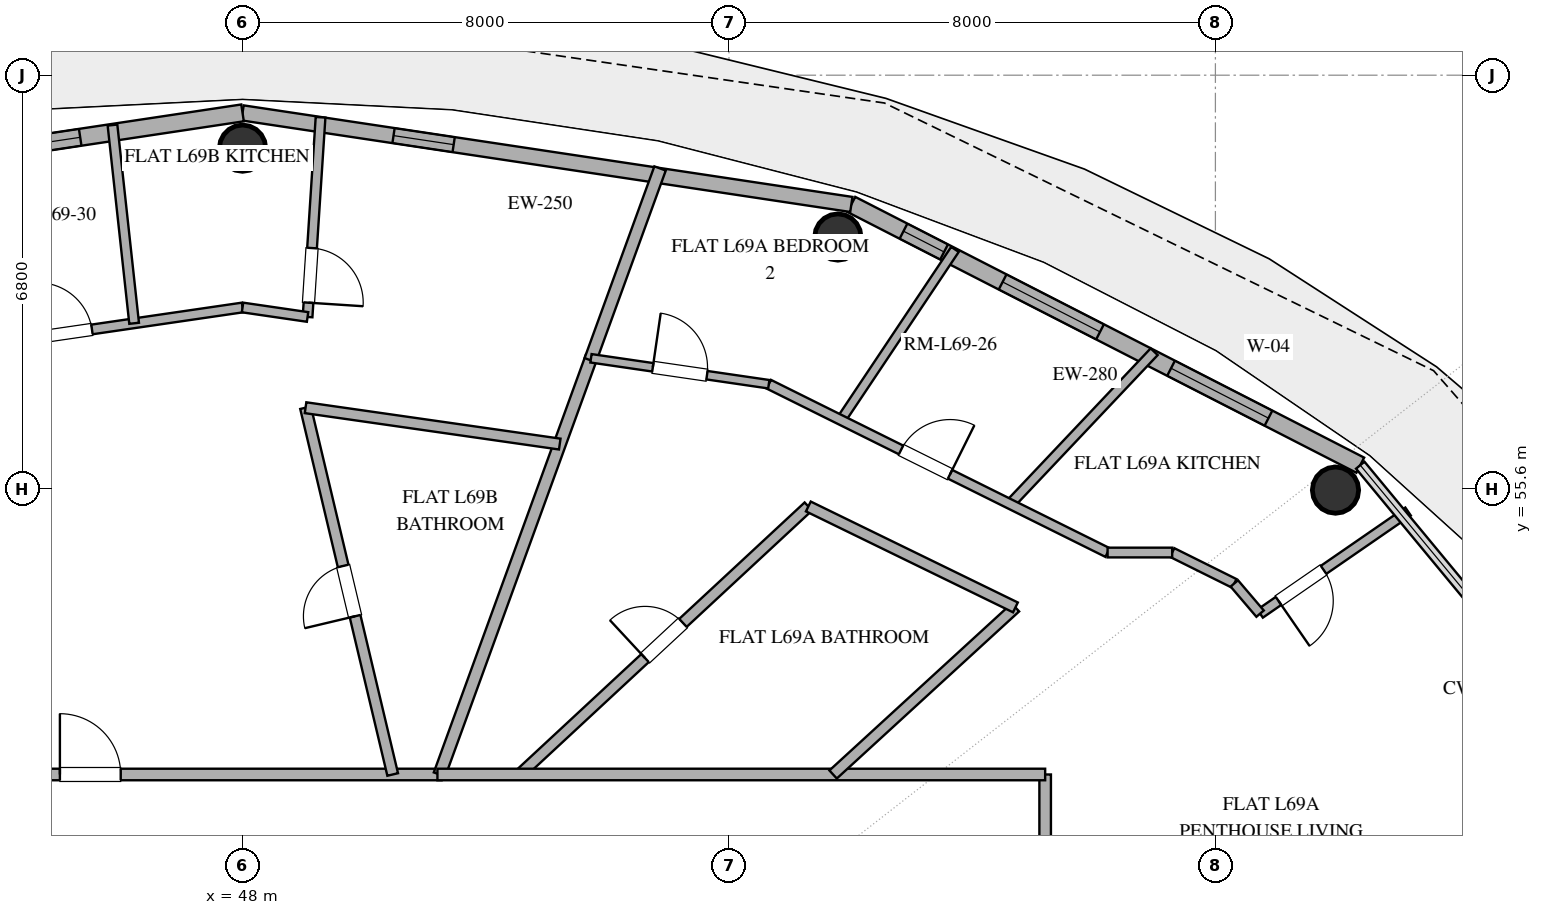
"""IFC4 building model, lengths in metres.
Left out: names, types, materials, properties, quantities, classifications, styles, units other than length and angle.
Written with IfcOpenShell. Run it as: python <this file> out.ifc"""

import sys

from ifc_helpers import new_model, si_unit, direction, frame, frame_2d, origin, origin_2d, place, context, subcontext, project, spatial, rectangle, hollow_circle, extrude, element, fill, save


model = new_model("IFC4")
c1 = context("Model", 3, precision=1e-05, world=origin(), true_north=direction((0.0, 1.0)))
c2 = subcontext(c1, "Body", "Model", "MODEL_VIEW")
j1 = project(units=[si_unit("LENGTHUNIT", "METRE"), si_unit("PLANEANGLEUNIT", "RADIAN")], contexts=[c1])
p1 = place(None, origin())
s1 = spatial("IfcSite", under=j1, at=p1, CompositionType="ELEMENT")
p2 = place(p1, origin())
s2 = spatial("IfcBuilding", under=s1, at=p2, CompositionType="ELEMENT")
p3 = place(p2, frame((0.0, 0.0, 269.4)))
s3 = spatial("IfcBuildingStorey", under=s2, at=p3, CompositionType="ELEMENT", Elevation=269.4)
for number, where, z_axis, x_axis in (
    (1, (65.975, 55.576, 0.0), (0.0, 0.0, 1.0), (1.0, 0.0, 0.0)),
    (2, (57.791, 59.739, 0.0), (0.0, 0.0, 1.0), (1.0, 0.0, 0.0)),
    (3, (48.0, 61.2, 0.0), (0.0, 0.0, 1.0), (1.0, 0.0, 0.0)),
):
    element("IfcColumn", number, at=place(p3, frame(where, z_axis=z_axis, x_axis=x_axis)), inside=s3, PredefinedType="COLUMN", context=c2, shape_type="SweptSolid", body=[
        extrude(hollow_circle(Radius=0.381, WallThickness=0.025, at=origin_2d()), origin(), (0.0, 0.0, 1.0), 3.37),
    ])
p4 = place(p3, frame((66.383, 55.987, 0.0), z_axis=(0.0, 0.0, 1.0), x_axis=(-0.890007394051, 0.455946091699, 0.0)))
e4 = element("IfcWall", 4, at=p4, inside=s3, PredefinedType="SOLIDWALL", context=c2, shape_type="SweptSolid", body=[
    extrude(rectangle(XDim=9.404, YDim=0.28, at=frame_2d((4.702, 0.0))), origin(), (0.0, 0.0, 1.0), 3.37),
])
p5 = place(p4, frame((1.696, 0.0, 0.85)))
e5 = element("IfcOpeningElement", 5, at=p5, cuts=e4, PredefinedType="OPENING", context=c2, shape_type="SweptSolid", body=[
    extrude(rectangle(XDim=1.8, YDim=2.2, at=frame_2d((0.9, 1.1))), frame((0.0, 0.15, 0.0), z_axis=(0.0, -1.0, 0.0), x_axis=(1.0, 0.0, 0.0)), (0.0, 0.0, 1.0), 0.3),
])
p6 = place(p4, frame((4.809, 0.0, 0.85)))
e6 = element("IfcOpeningElement", 6, at=p6, cuts=e4, PredefinedType="OPENING", context=c2, shape_type="SweptSolid", body=[
    extrude(rectangle(XDim=1.8, YDim=2.2, at=frame_2d((0.9, 1.1))), frame((0.0, 0.15, 0.0), z_axis=(0.0, -1.0, 0.0), x_axis=(1.0, 0.0, 0.0)), (0.0, 0.0, 1.0), 0.3),
])
p7 = place(p4, frame((7.691, 0.0, 0.85)))
e7 = element("IfcOpeningElement", 7, at=p7, cuts=e4, PredefinedType="OPENING", context=c2, shape_type="SweptSolid", body=[
    extrude(rectangle(XDim=0.75, YDim=1.8, at=frame_2d((0.375, 0.9))), frame((0.0, 0.15, 0.0), z_axis=(0.0, -1.0, 0.0), x_axis=(1.0, 0.0, 0.0)), (0.0, 0.0, 1.0), 0.3),
])
p8 = place(p3, frame((58.013, 60.274, 0.0), z_axis=(0.0, 0.0, 1.0), x_axis=(-0.988882522213, 0.148698881169, 0.0)))
e8 = element("IfcWall", 8, at=p8, inside=s3, PredefinedType="SOLIDWALL", context=c2, shape_type="SweptSolid", body=[
    extrude(rectangle(XDim=10.125, YDim=0.25, at=frame_2d((5.062, 0.0))), origin(), (0.0, 0.0, 1.0), 3.37),
])
p9 = place(p8, frame((6.614, 0.0, 1.42)))
e9 = element("IfcOpeningElement", 9, at=p9, cuts=e8, PredefinedType="OPENING", context=c2, shape_type="SweptSolid", body=[
    extrude(rectangle(XDim=1.0, YDim=1.05, at=frame_2d((0.5, 0.525))), frame((0.0, 0.135, 0.0), z_axis=(0.0, -1.0, 0.0), x_axis=(1.0, 0.0, 0.0)), (0.0, 0.0, 1.0), 0.27),
])
p10 = place(p3, frame((48.0, 61.78, 0.0), z_axis=(0.0, 0.0, 1.0), x_axis=(-0.988882522213, -0.148698881169, 0.0)))
e10 = element("IfcWall", 10, at=p10, inside=s3, PredefinedType="SOLIDWALL", context=c2, shape_type="SweptSolid", body=[
    extrude(rectangle(XDim=10.125, YDim=0.28, at=frame_2d((5.062, 0.0))), origin(), (0.0, 0.0, 1.0), 3.37),
])
p11 = place(p10, frame((2.7, 0.0, 0.85)))
e11 = element("IfcOpeningElement", 11, at=p11, cuts=e10, PredefinedType="OPENING", context=c2, shape_type="SweptSolid", body=[
    extrude(rectangle(XDim=1.65, YDim=2.0, at=frame_2d((0.825, 1.0))), frame((0.0, 0.15, 0.0), z_axis=(0.0, -1.0, 0.0), x_axis=(1.0, 0.0, 0.0)), (0.0, 0.0, 1.0), 0.3),
])
p12 = place(p10, frame((7.456, 0.0, 0.0)))
e12 = element("IfcOpeningElement", 12, at=p12, cuts=e10, PredefinedType="OPENING", context=c2, shape_type="SweptSolid", body=[
    extrude(rectangle(XDim=1.1, YDim=2.25, at=frame_2d((0.55, 1.125))), frame((0.0, 0.15, 0.0), z_axis=(0.0, -1.0, 0.0), x_axis=(1.0, 0.0, 0.0)), (0.0, 0.0, 1.0), 0.3),
])
p13 = place(p3, frame((34.8, 50.9, 0.0), z_axis=(0.0, 0.0, 1.0), x_axis=(1.0, 0.0, 0.0)))
e13 = element("IfcWall", 13, at=p13, inside=s3, PredefinedType="PARTITIONING", context=c2, shape_type="SweptSolid", body=[
    extrude(rectangle(XDim=16.473, YDim=0.19, at=frame_2d((8.237, 0.0))), origin(), (0.0, 0.0, 1.0), 2.73),
])
p14 = place(p13, frame((10.196, 0.0, 0.0)))
e14 = element("IfcOpeningElement", 14, at=p14, cuts=e13, PredefinedType="OPENING", context=c2, shape_type="SweptSolid", body=[
    extrude(rectangle(XDim=1.0, YDim=2.2, at=frame_2d((0.5, 1.1))), frame((0.0, 0.105, 0.0), z_axis=(0.0, -1.0, 0.0), x_axis=(1.0, 0.0, 0.0)), (0.0, 0.0, 1.0), 0.21),
])
p15 = place(p13, frame((2.387, 0.0, 0.0)))
e15 = element("IfcOpeningElement", 15, at=p15, cuts=e13, PredefinedType="OPENING", context=c2, shape_type="SweptSolid", body=[
    extrude(rectangle(XDim=1.0, YDim=2.2, at=frame_2d((0.5, 1.1))), frame((0.0, 0.105, 0.0), z_axis=(0.0, -1.0, 0.0), x_axis=(1.0, 0.0, 0.0)), (0.0, 0.0, 1.0), 0.21),
])
p16 = place(p3, frame((52.558, 50.9, 0.0), z_axis=(0.0, 0.0, 1.0), x_axis=(0.732849863846, 0.68039038578, 0.0)))
e16 = element("IfcWall", 16, at=p16, inside=s3, PredefinedType="PLUMBINGWALL", context=c2, shape_type="SweptSolid", body=[
    extrude(rectangle(XDim=6.478, YDim=0.18, at=frame_2d((3.239, 0.0))), origin(), (0.0, 0.0, 1.0), 2.73),
])
p17 = place(p16, frame((2.814, 0.0, 0.0)))
e17 = element("IfcOpeningElement", 17, at=p17, cuts=e16, PredefinedType="OPENING", context=c2, shape_type="SweptSolid", body=[
    extrude(rectangle(XDim=0.85, YDim=2.1, at=frame_2d((0.425, 1.05))), frame((0.0, 0.1, 0.0), z_axis=(0.0, -1.0, 0.0), x_axis=(1.0, 0.0, 0.0)), (0.0, 0.0, 1.0), 0.2),
])
p18 = place(p3, frame((50.469, 50.9, 0.0), z_axis=(0.0, 0.0, 1.0), x_axis=(-0.231121823084, 0.972924818727, 0.0)))
e18 = element("IfcWall", 18, at=p18, inside=s3, PredefinedType="PLUMBINGWALL", context=c2, shape_type="SweptSolid", body=[
    extrude(rectangle(XDim=6.2, YDim=0.18, at=frame_2d((3.1, 0.0))), origin(), (0.0, 0.0, 1.0), 2.73),
])
p19 = place(p18, frame((2.675, 0.0, 0.0)))
e19 = element("IfcOpeningElement", 19, at=p19, cuts=e18, PredefinedType="OPENING", context=c2, shape_type="SweptSolid", body=[
    extrude(rectangle(XDim=0.85, YDim=2.1, at=frame_2d((0.425, 1.05))), frame((0.0, 0.1, 0.0), z_axis=(0.0, -1.0, 0.0), x_axis=(1.0, 0.0, 0.0)), (0.0, 0.0, 1.0), 0.2),
])
p20 = place(p3, frame((51.239, 50.9, 0.0), z_axis=(0.0, 0.0, 1.0), x_axis=(0.342027045015, 0.939690108748, 0.0)))
e20 = element("IfcWall", 20, at=p20, inside=s3, PredefinedType="PARTITIONING", context=c2, shape_type="SweptSolid", body=[
    extrude(rectangle(XDim=7.316, YDim=0.2, at=frame_2d((3.658, 0.0))), origin(), (0.0, 0.0, 1.0), 2.73),
])
p21 = place(p3, frame((61.2, 50.9, 0.0), z_axis=(0.0, 0.0, 1.0), x_axis=(0.0, -1.0, 0.0)))
e21 = element("IfcWall", 21, at=p21, inside=s3, PredefinedType="PARTITIONING", context=c2, shape_type="SweptSolid", body=[
    extrude(rectangle(XDim=12.47, YDim=0.19, at=frame_2d((6.235, 0.0))), origin(), (0.0, 0.0, 1.0), 2.73),
])
p22 = place(p21, frame((2.198, 0.0, 0.0)))
e22 = element("IfcOpeningElement", 22, at=p22, cuts=e21, PredefinedType="OPENING", context=c2, shape_type="SweptSolid", body=[
    extrude(rectangle(XDim=1.0, YDim=2.2, at=frame_2d((0.5, 1.1))), frame((0.0, 0.105, 0.0), z_axis=(0.0, -1.0, 0.0), x_axis=(1.0, 0.0, 0.0)), (0.0, 0.0, 1.0), 0.21),
])
p23 = place(p21, frame((7.38, 0.0, 0.0)))
e23 = element("IfcOpeningElement", 23, at=p23, cuts=e21, PredefinedType="OPENING", context=c2, shape_type="SweptSolid", body=[
    extrude(rectangle(XDim=1.0, YDim=2.2, at=frame_2d((0.5, 1.1))), frame((0.0, 0.105, 0.0), z_axis=(0.0, -1.0, 0.0), x_axis=(1.0, 0.0, 0.0)), (0.0, 0.0, 1.0), 0.21),
])
p24 = place(p3, frame((51.205, 50.9, 0.0), z_axis=(0.0, 0.0, 1.0), x_axis=(1.0, 0.0, 0.0)))
e24 = element("IfcWall", 24, at=p24, inside=s3, PredefinedType="PARTITIONING", context=c2, shape_type="SweptSolid", body=[
    extrude(rectangle(XDim=9.995, YDim=0.19, at=frame_2d((4.998, 0.0))), origin(), (0.0, 0.0, 1.0), 2.73),
])
p25 = place(p3, frame((49.036, 56.932, 0.0), z_axis=(0.0, 0.0, 1.0), x_axis=(0.989927514161, -0.141575127434, 0.0)))
e25 = element("IfcWall", 25, at=p25, inside=s3, PredefinedType="PLUMBINGWALL", context=c2, shape_type="SweptSolid", body=[
    extrude(rectangle(XDim=4.223, YDim=0.18, at=frame_2d((2.112, 0.0))), origin(), (0.0, 0.0, 1.0), 2.73),
])
p26 = place(p3, frame((60.711, 53.648, 0.0), z_axis=(0.0, 0.0, 1.0), x_axis=(-0.737258783223, -0.675610454745, 0.0)))
e26 = element("IfcWall", 26, at=p26, inside=s3, PredefinedType="PLUMBINGWALL", context=c2, shape_type="SweptSolid", body=[
    extrude(rectangle(XDim=4.067, YDim=0.18, at=frame_2d((2.034, 0.0))), origin(), (0.0, 0.0, 1.0), 2.73),
])
p27 = place(p3, frame((57.305, 55.308, 0.0), z_axis=(0.0, 0.0, 1.0), x_axis=(0.898917645735, -0.438117639667, 0.0)))
e27 = element("IfcWall", 27, at=p27, inside=s3, PredefinedType="PLUMBINGWALL", context=c2, shape_type="SweptSolid", body=[
    extrude(rectangle(XDim=3.789, YDim=0.18, at=frame_2d((1.895, 0.0))), origin(), (0.0, 0.0, 1.0), 2.73),
])
p28 = place(p3, frame((39.345, 57.318, 0.0), z_axis=(0.0, 0.0, 1.0), x_axis=(0.989536136377, 0.144285254977, 0.0)))
e28 = element("IfcWall", 28, at=p28, inside=s3, PredefinedType="PLUMBINGWALL", context=c2, shape_type="SweptSolid", body=[
    extrude(rectangle(XDim=8.746, YDim=0.16, at=frame_2d((4.373, 0.0))), origin(), (0.0, 0.0, 1.0), 2.73),
])
p29 = place(p28, frame((2.481, 0.0, 0.0)))
e29 = element("IfcOpeningElement", 29, at=p29, cuts=e28, PredefinedType="OPENING", context=c2, shape_type="SweptSolid", body=[
    extrude(rectangle(XDim=0.9, YDim=2.1, at=frame_2d((0.45, 1.05))), frame((0.0, 0.09, 0.0), z_axis=(0.0, -1.0, 0.0), x_axis=(1.0, 0.0, 0.0)), (0.0, 0.0, 1.0), 0.18),
])
p30 = place(p28, frame((5.344, 0.0, 0.0)))
e30 = element("IfcOpeningElement", 30, at=p30, cuts=e28, PredefinedType="OPENING", context=c2, shape_type="SweptSolid", body=[
    extrude(rectangle(XDim=0.9, YDim=2.1, at=frame_2d((0.45, 1.05))), frame((0.0, 0.09, 0.0), z_axis=(0.0, -1.0, 0.0), x_axis=(1.0, 0.0, 0.0)), (0.0, 0.0, 1.0), 0.18),
])
p31 = place(p3, frame((60.623, 55.347, 0.0), z_axis=(0.0, 0.0, 1.0), x_axis=(0.687190766796, 0.726477012734, 0.0)))
e31 = element("IfcWall", 31, at=p31, inside=s3, PredefinedType="PLUMBINGWALL", context=c2, shape_type="SweptSolid", body=[
    extrude(rectangle(XDim=3.449, YDim=0.16, at=frame_2d((1.725, 0.0))), origin(), (0.0, 0.0, 1.0), 2.73),
])
p32 = place(p3, frame((59.717, 59.535, 0.0), z_axis=(0.0, 0.0, 1.0), x_axis=(-0.555567743092, -0.831471276013, 0.0)))
e32 = element("IfcWall", 32, at=p32, inside=s3, PredefinedType="PARTITIONING", context=c2, shape_type="SweptSolid", body=[
    extrude(rectangle(XDim=3.376, YDim=0.15, at=frame_2d((1.688, 0.0))), origin(), (0.0, 0.0, 1.0), 2.73),
])
p33 = place(p3, frame((54.867, 60.866, 0.0), z_axis=(0.0, 0.0, 1.0), x_axis=(-0.342000121366, -0.939699907942, 0.0)))
e33 = element("IfcWall", 33, at=p33, inside=s3, PredefinedType="PARTITIONING", context=c2, shape_type="SweptSolid", body=[
    extrude(rectangle(XDim=3.355, YDim=0.2, at=frame_2d((1.678, 0.0))), origin(), (0.0, 0.0, 1.0), 2.73),
])
p34 = place(p3, frame((49.283, 61.708, 0.0), z_axis=(0.0, 0.0, 1.0), x_axis=(-0.064987599341, -0.997886071619, 0.0)))
e34 = element("IfcWall", 34, at=p34, inside=s3, PredefinedType="PLUMBINGWALL", context=c2, shape_type="SweptSolid", body=[
    extrude(rectangle(XDim=3.291, YDim=0.16, at=frame_2d((1.646, 0.0))), origin(), (0.0, 0.0, 1.0), 2.73),
])
p35 = place(p34, frame((2.156, 0.0, 0.0)))
e35 = element("IfcOpeningElement", 35, at=p35, cuts=e34, PredefinedType="OPENING", context=c2, shape_type="SweptSolid", body=[
    extrude(rectangle(XDim=0.9, YDim=2.1, at=frame_2d((0.45, 1.05))), frame((0.0, 0.09, 0.0), z_axis=(0.0, -1.0, 0.0), x_axis=(1.0, 0.0, 0.0)), (0.0, 0.0, 1.0), 0.18),
])
p36 = place(p3, frame((46.217, 58.32, 0.0), z_axis=(0.0, 0.0, 1.0), x_axis=(-0.108559889868, 0.994089910577, 0.0)))
e36 = element("IfcWall", 36, at=p36, inside=s3, PredefinedType="PLUMBINGWALL", context=c2, shape_type="SweptSolid", body=[
    extrude(rectangle(XDim=3.279, YDim=0.16, at=frame_2d((1.639, 0.0))), origin(), (0.0, 0.0, 1.0), 2.73),
])
p37 = place(p3, frame((56.655, 57.318, 0.0), z_axis=(0.0, 0.0, 1.0), x_axis=(0.89555447129, -0.444951895099, 0.0)))
e37 = element("IfcWall", 37, at=p37, inside=s3, PredefinedType="PLUMBINGWALL", context=c2, shape_type="SweptSolid", body=[
    extrude(rectangle(XDim=6.222, YDim=0.16, at=frame_2d((3.111, 0.0))), origin(), (0.0, 0.0, 1.0), 2.73),
])
p38 = place(p37, frame((2.428, 0.0, 0.0)))
e38 = element("IfcOpeningElement", 38, at=p38, cuts=e37, PredefinedType="OPENING", context=c2, shape_type="SweptSolid", body=[
    extrude(rectangle(XDim=0.9, YDim=2.1, at=frame_2d((0.45, 1.05))), frame((0.0, 0.09, 0.0), z_axis=(0.0, -1.0, 0.0), x_axis=(1.0, 0.0, 0.0)), (0.0, 0.0, 1.0), 0.18),
])
p39 = place(p3, frame((67.169, 55.224, 0.0), z_axis=(0.0, 0.0, 1.0), x_axis=(-0.823115625857, -0.567873812101, 0.0)))
e39 = element("IfcWall", 39, at=p39, inside=s3, PredefinedType="PLUMBINGWALL", context=c2, shape_type="SweptSolid", body=[
    extrude(rectangle(XDim=2.957, YDim=0.16, at=frame_2d((1.478, 0.0))), origin(), (0.0, 0.0, 1.0), 2.73),
])
p40 = place(p39, frame((1.688, 0.0, 0.0)))
e40 = element("IfcOpeningElement", 40, at=p40, cuts=e39, PredefinedType="OPENING", context=c2, shape_type="SweptSolid", body=[
    extrude(rectangle(XDim=0.9, YDim=2.1, at=frame_2d((0.45, 1.05))), frame((0.0, 0.09, 0.0), z_axis=(0.0, -1.0, 0.0), x_axis=(1.0, 0.0, 0.0)), (0.0, 0.0, 1.0), 0.18),
])
p41 = place(p3, frame((53.73, 57.744, 0.0), z_axis=(0.0, 0.0, 1.0), x_axis=(0.989530523264, -0.144323745545, 0.0)))
e41 = element("IfcWall", 41, at=p41, inside=s3, PredefinedType="PARTITIONING", context=c2, shape_type="SweptSolid", body=[
    extrude(rectangle(XDim=2.955, YDim=0.14, at=frame_2d((1.478, 0.0))), origin(), (0.0, 0.0, 1.0), 2.73),
])
p42 = place(p41, frame((1.028, 0.0, 0.0)))
e42 = element("IfcOpeningElement", 42, at=p42, cuts=e41, PredefinedType="OPENING", context=c2, shape_type="SweptSolid", body=[
    extrude(rectangle(XDim=0.9, YDim=2.1, at=frame_2d((0.45, 1.05))), frame((0.0, 0.08, 0.0), z_axis=(0.0, -1.0, 0.0), x_axis=(1.0, 0.0, 0.0)), (0.0, 0.0, 1.0), 0.16),
])
p43 = place(p3, frame((64.311, 54.042, 0.0), z_axis=(0.0, 0.0, 1.0), x_axis=(-0.895409226325, 0.445244109912, 0.0)))
e43 = element("IfcWall", 43, at=p43, inside=s3, PredefinedType="PLUMBINGWALL", context=c2, shape_type="SweptSolid", body=[
    extrude(rectangle(XDim=1.141, YDim=0.16, at=frame_2d((0.571, 0.0))), origin(), (0.0, 0.0, 1.0), 2.73),
])
p44 = place(p3, frame((49.069, 58.424, 0.0), z_axis=(0.0, 0.0, 1.0), x_axis=(-0.989520204584, 0.144394476074, 0.0)))
e44 = element("IfcWall", 44, at=p44, inside=s3, PredefinedType="PLUMBINGWALL", context=c2, shape_type="SweptSolid", body=[
    extrude(rectangle(XDim=1.08, YDim=0.16, at=frame_2d((0.54, 0.0))), origin(), (0.0, 0.0, 1.0), 2.73),
])
p45 = place(p3, frame((63.289, 54.55, 0.0), z_axis=(0.0, 0.0, 1.0), x_axis=(-1.0, 0.0, 0.0)))
e45 = element("IfcWall", 45, at=p45, inside=s3, PredefinedType="PLUMBINGWALL", context=c2, shape_type="SweptSolid", body=[
    extrude(rectangle(XDim=1.062, YDim=0.16, at=frame_2d((0.531, 0.0))), origin(), (0.0, 0.0, 1.0), 2.73),
])
p46 = place(p3, frame((64.735, 53.545, 0.0), z_axis=(0.0, 0.0, 1.0), x_axis=(-0.649220192727, 0.760600513644, 0.0)))
e46 = element("IfcWall", 46, at=p46, inside=s3, PredefinedType="PLUMBINGWALL", context=c2, shape_type="SweptSolid", body=[
    extrude(rectangle(XDim=0.653, YDim=0.16, at=frame_2d((0.327, 0.0))), origin(), (0.0, 0.0, 1.0), 2.73),
])
p47 = place(p5, origin())
e47 = element("IfcWindow", 47, at=p47, inside=s3, PartitioningType="SINGLE_PANEL", PredefinedType="WINDOW", context=c2, shape_type="SweptSolid", body=[
    extrude(rectangle(XDim=1.8, YDim=2.2, at=frame_2d((0.9, 1.1))), frame((0.0, 0.03, 0.0), z_axis=(0.0, -1.0, 0.0), x_axis=(1.0, 0.0, 0.0)), (0.0, 0.0, 1.0), 0.06),
])
fill(e5, e47)
p48 = place(p6, origin())
e48 = element("IfcWindow", 48, at=p48, inside=s3, PartitioningType="SINGLE_PANEL", PredefinedType="WINDOW", context=c2, shape_type="SweptSolid", body=[
    extrude(rectangle(XDim=1.8, YDim=2.2, at=frame_2d((0.9, 1.1))), frame((0.0, 0.03, 0.0), z_axis=(0.0, -1.0, 0.0), x_axis=(1.0, 0.0, 0.0)), (0.0, 0.0, 1.0), 0.06),
])
fill(e6, e48)
p49 = place(p11, origin())
e49 = element("IfcWindow", 49, at=p49, inside=s3, PartitioningType="SINGLE_PANEL", PredefinedType="WINDOW", context=c2, shape_type="SweptSolid", body=[
    extrude(rectangle(XDim=1.65, YDim=2.0, at=frame_2d((0.825, 1.0))), frame((0.0, 0.03, 0.0), z_axis=(0.0, -1.0, 0.0), x_axis=(1.0, 0.0, 0.0)), (0.0, 0.0, 1.0), 0.06),
])
fill(e11, e49)
p50 = place(p7, origin())
e50 = element("IfcWindow", 50, at=p50, inside=s3, PartitioningType="SINGLE_PANEL", PredefinedType="WINDOW", context=c2, shape_type="SweptSolid", body=[
    extrude(rectangle(XDim=0.75, YDim=1.8, at=frame_2d((0.375, 0.9))), frame((0.0, 0.03, 0.0), z_axis=(0.0, -1.0, 0.0), x_axis=(1.0, 0.0, 0.0)), (0.0, 0.0, 1.0), 0.06),
])
fill(e7, e50)
p51 = place(p9, origin())
e51 = element("IfcWindow", 51, at=p51, inside=s3, PartitioningType="SINGLE_PANEL", PredefinedType="WINDOW", context=c2, shape_type="SweptSolid", body=[
    extrude(rectangle(XDim=1.0, YDim=1.05, at=frame_2d((0.5, 0.525))), frame((0.0, 0.03, 0.0), z_axis=(0.0, -1.0, 0.0), x_axis=(1.0, 0.0, 0.0)), (0.0, 0.0, 1.0), 0.06),
])
fill(e9, e51)
p52 = place(p14, origin())
e52 = element("IfcDoor", 52, at=p52, inside=s3, OperationType="SINGLE_SWING_LEFT", PredefinedType="DOOR", context=c2, shape_type="SweptSolid", body=[
    extrude(rectangle(XDim=1.0, YDim=2.2, at=frame_2d((0.5, 1.1))), frame((0.0, 0.025, 0.0), z_axis=(0.0, -1.0, 0.0), x_axis=(1.0, 0.0, 0.0)), (0.0, 0.0, 1.0), 0.05),
])
fill(e14, e52)
p53 = place(p17, origin())
e53 = element("IfcDoor", 53, at=p53, inside=s3, OperationType="SINGLE_SWING_LEFT", PredefinedType="DOOR", context=c2, shape_type="SweptSolid", body=[
    extrude(rectangle(XDim=0.85, YDim=2.1, at=frame_2d((0.425, 1.05))), frame((0.0, 0.025, 0.0), z_axis=(0.0, -1.0, 0.0), x_axis=(1.0, 0.0, 0.0)), (0.0, 0.0, 1.0), 0.05),
])
fill(e17, e53)
p54 = place(p19, origin())
e54 = element("IfcDoor", 54, at=p54, inside=s3, OperationType="SINGLE_SWING_LEFT", PredefinedType="DOOR", context=c2, shape_type="SweptSolid", body=[
    extrude(rectangle(XDim=0.85, YDim=2.1, at=frame_2d((0.425, 1.05))), frame((0.0, 0.025, 0.0), z_axis=(0.0, -1.0, 0.0), x_axis=(1.0, 0.0, 0.0)), (0.0, 0.0, 1.0), 0.05),
])
fill(e19, e54)
p55 = place(p30, origin())
e55 = element("IfcDoor", 55, at=p55, inside=s3, OperationType="SINGLE_SWING_LEFT", PredefinedType="DOOR", context=c2, shape_type="SweptSolid", body=[
    extrude(rectangle(XDim=0.9, YDim=2.1, at=frame_2d((0.45, 1.05))), frame((0.0, 0.025, 0.0), z_axis=(0.0, -1.0, 0.0), x_axis=(1.0, 0.0, 0.0)), (0.0, 0.0, 1.0), 0.05),
])
fill(e30, e55)
p56 = place(p35, origin())
e56 = element("IfcDoor", 56, at=p56, inside=s3, OperationType="SINGLE_SWING_RIGHT", PredefinedType="DOOR", context=c2, shape_type="SweptSolid", body=[
    extrude(rectangle(XDim=0.9, YDim=2.1, at=frame_2d((0.45, 1.05))), frame((0.0, 0.025, 0.0), z_axis=(0.0, -1.0, 0.0), x_axis=(1.0, 0.0, 0.0)), (0.0, 0.0, 1.0), 0.05),
])
fill(e35, e56)
p57 = place(p38, origin())
e57 = element("IfcDoor", 57, at=p57, inside=s3, OperationType="SINGLE_SWING_RIGHT", PredefinedType="DOOR", context=c2, shape_type="SweptSolid", body=[
    extrude(rectangle(XDim=0.9, YDim=2.1, at=frame_2d((0.45, 1.05))), frame((0.0, 0.025, 0.0), z_axis=(0.0, -1.0, 0.0), x_axis=(1.0, 0.0, 0.0)), (0.0, 0.0, 1.0), 0.05),
])
fill(e38, e57)
p58 = place(p40, origin())
e58 = element("IfcDoor", 58, at=p58, inside=s3, OperationType="SINGLE_SWING_RIGHT", PredefinedType="DOOR", context=c2, shape_type="SweptSolid", body=[
    extrude(rectangle(XDim=0.9, YDim=2.1, at=frame_2d((0.45, 1.05))), frame((0.0, 0.025, 0.0), z_axis=(0.0, -1.0, 0.0), x_axis=(1.0, 0.0, 0.0)), (0.0, 0.0, 1.0), 0.05),
])
fill(e40, e58)
p59 = place(p42, origin())
e59 = element("IfcDoor", 59, at=p59, inside=s3, OperationType="SINGLE_SWING_LEFT", PredefinedType="DOOR", context=c2, shape_type="SweptSolid", body=[
    extrude(rectangle(XDim=0.9, YDim=2.1, at=frame_2d((0.45, 1.05))), frame((0.0, 0.025, 0.0), z_axis=(0.0, -1.0, 0.0), x_axis=(1.0, 0.0, 0.0)), (0.0, 0.0, 1.0), 0.05),
])
fill(e42, e59)
save(model, sys.argv[1])
